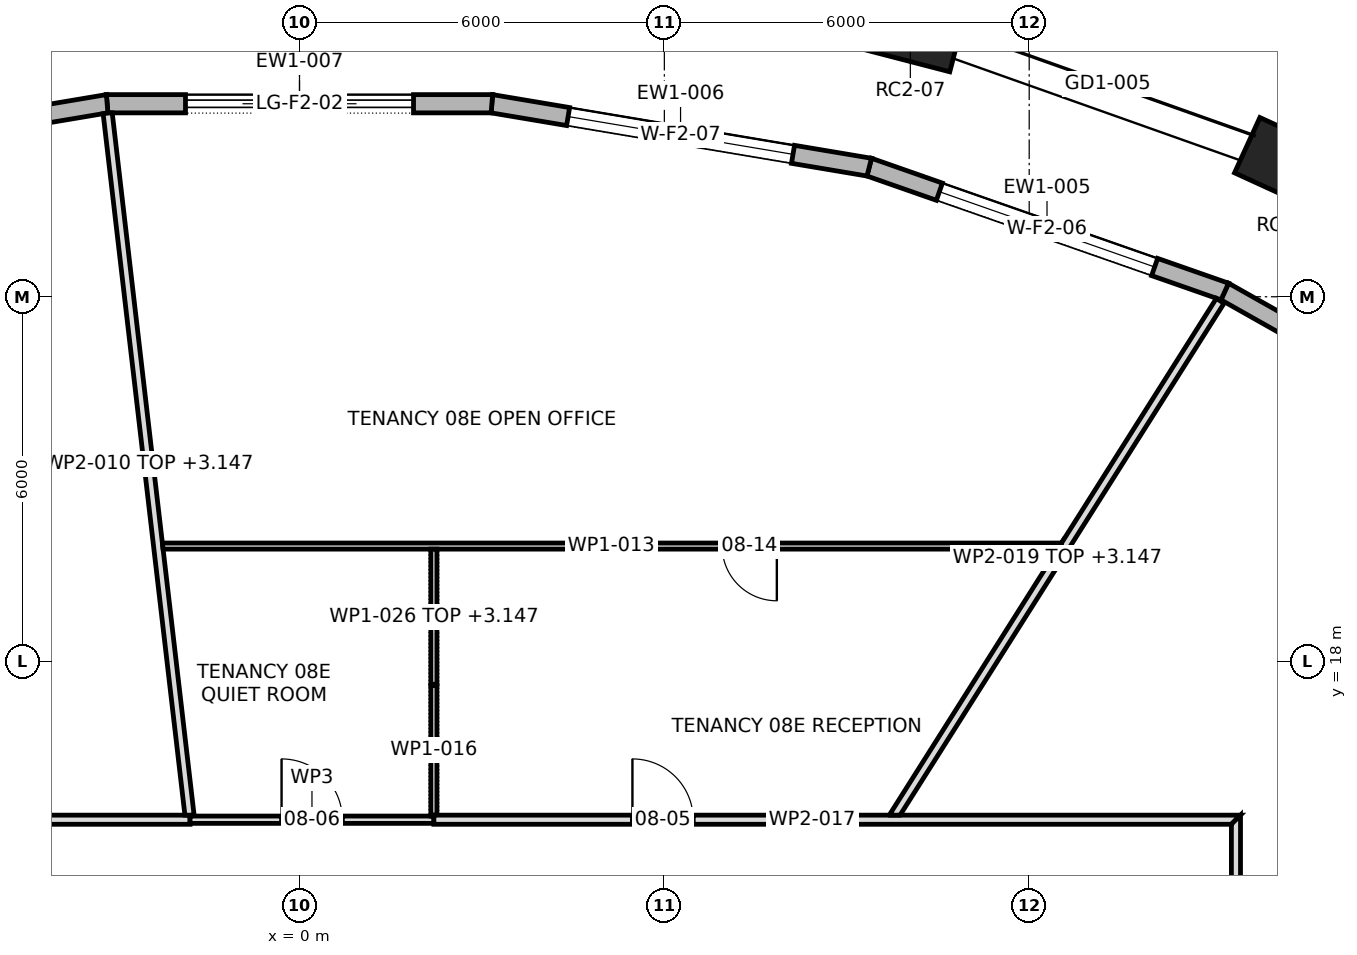
"""IFC4 building model, lengths in metres.
Left out: names, types, materials, properties, quantities, classifications, styles, units other than length and angle.
Written with IfcOpenShell. Run it as: python <this file> out.ifc"""

import sys

from ifc_helpers import new_model, si_unit, direction, frame, frame_2d, origin, origin_2d, place, context, subcontext, project, spatial, polyline, rectangle, outline, extrude, element, fill, save


model = new_model("IFC4")
c1 = context("Model", 3, precision=1e-05, world=origin(), true_north=direction((0.0, 1.0)))
c2 = subcontext(c1, "Body", "Model", "MODEL_VIEW")
j1 = project(units=[si_unit("LENGTHUNIT", "METRE"), si_unit("PLANEANGLEUNIT", "RADIAN")], contexts=[c1])
p1 = place(None, origin())
s1 = spatial("IfcSite", under=j1, at=p1, CompositionType="ELEMENT")
p2 = place(p1, origin())
s2 = spatial("IfcBuilding", under=s1, at=p2, CompositionType="ELEMENT")
p3 = place(p2, frame((0.0, 0.0, 125.5)))
s3 = spatial("IfcBuildingStorey", under=s2, at=p3, CompositionType="ELEMENT", Elevation=125.5)
for number, where, z_axis, x_axis in (
    (1, (16.313, 26.159, 0.0), (0.0, 0.0, 1.0), (-0.909, 0.417, 0.0)),
    (2, (10.045, 28.385, 0.0), (0.0, 0.0, 1.0), (-0.968, 0.252, 0.0)),
):
    element("IfcColumn", number, at=place(p3, frame(where, z_axis=z_axis, x_axis=x_axis)), inside=s3, PredefinedType="COLUMN", context=c2, shape_type="SweptSolid", body=[
        extrude(rectangle(XDim=1.6, YDim=1.0, at=origin_2d()), origin(), (0.0, 0.0, 1.0), 4.2),
    ])
p4 = place(p3, frame((20.48, 21.115, 0.0), z_axis=(0.0, 0.0, 1.0), x_axis=(-0.870858332497, 0.491534093142, 0.0)))
e3 = element("IfcWall", 3, at=p4, inside=s3, PredefinedType="STANDARD", context=c2, shape_type="SweptSolid", body=[
    extrude(outline(polyline([(-0.014, -0.15), (6.058, -0.15), (6.031, 0.15), (0.014, 0.15), (-0.014, -0.15)])), origin(), (0.0, 0.0, 1.0), 3.9),
])
p5 = place(p4, frame((1.147, 0.0, 0.6)))
e4 = element("IfcOpeningElement", 4, at=p5, cuts=e3, PredefinedType="OPENING", context=c2, shape_type="SweptSolid", body=[
    extrude(rectangle(XDim=3.75, YDim=2.85, at=frame_2d((1.875, 1.425))), frame((0.0, 0.162, 0.0), z_axis=(0.0, -1.0, 0.0), x_axis=(1.0, 0.0, 0.0)), (0.0, 0.0, 1.0), 0.324),
])
p6 = place(p3, frame((15.216, 24.086, 0.0), z_axis=(0.0, 0.0, 1.0), x_axis=(-0.94389706045, 0.330239820849, 0.0)))
e5 = element("IfcWall", 5, at=p6, inside=s3, PredefinedType="STANDARD", context=c2, shape_type="SweptSolid", body=[
    extrude(outline(polyline([(-0.013, -0.15), (6.207, -0.15), (6.182, 0.15), (0.013, 0.15), (-0.013, -0.15)])), origin(), (0.0, 0.0, 1.0), 3.9),
])
p7 = place(p6, frame((1.222, 0.0, 0.6)))
e6 = element("IfcOpeningElement", 6, at=p7, cuts=e5, PredefinedType="OPENING", context=c2, shape_type="SweptSolid", body=[
    extrude(rectangle(XDim=3.75, YDim=2.85, at=frame_2d((1.875, 1.425))), frame((0.0, 0.162, 0.0), z_axis=(0.0, -1.0, 0.0), x_axis=(1.0, 0.0, 0.0)), (0.0, 0.0, 1.0), 0.324),
])
p8 = place(p3, frame((9.369, 26.131, 0.0), z_axis=(0.0, 0.0, 1.0), x_axis=(-0.986176011722, 0.165701158427, 0.0)))
e7 = element("IfcWall", 7, at=p8, inside=s3, PredefinedType="STANDARD", context=c2, shape_type="SweptSolid", body=[
    extrude(outline(polyline([(-0.013, -0.15), (6.305, -0.15), (6.28, 0.15), (0.013, 0.15), (-0.013, -0.15)])), origin(), (0.0, 0.0, 1.0), 3.9),
])
p9 = place(p8, frame((1.271, 0.0, 0.6)))
e8 = element("IfcOpeningElement", 8, at=p9, cuts=e7, PredefinedType="OPENING", context=c2, shape_type="SweptSolid", body=[
    extrude(rectangle(XDim=3.75, YDim=2.85, at=frame_2d((1.875, 1.425))), frame((0.0, 0.162, 0.0), z_axis=(0.0, -1.0, 0.0), x_axis=(1.0, 0.0, 0.0)), (0.0, 0.0, 1.0), 0.324),
])
p10 = place(p3, frame((3.164, 27.174, 0.0), z_axis=(0.0, 0.0, 1.0), x_axis=(-1.0, 0.0, 0.0)))
e9 = element("IfcWall", 9, at=p10, inside=s3, PredefinedType="STANDARD", context=c2, shape_type="SweptSolid", body=[
    extrude(outline(polyline([(-0.012, -0.15), (6.34, -0.15), (6.315, 0.15), (0.012, 0.15), (-0.012, -0.15)])), origin(), (0.0, 0.0, 1.0), 3.9),
])
p11 = place(p10, frame((1.289, 0.0, 0.0)))
e10 = element("IfcOpeningElement", 10, at=p11, cuts=e9, PredefinedType="OPENING", context=c2, shape_type="SweptSolid", body=[
    extrude(rectangle(XDim=3.75, YDim=3.45, at=frame_2d((1.875, 1.725))), frame((0.0, 0.162, 0.0), z_axis=(0.0, -1.0, 0.0), x_axis=(1.0, 0.0, 0.0)), (0.0, 0.0, 1.0), 0.324),
])
p12 = place(p3, frame((-3.164, 27.174, 0.0), z_axis=(0.0, 0.0, 1.0), x_axis=(-0.986176011722, -0.165701158427, 0.0)))
e11 = element("IfcWall", 11, at=p12, inside=s3, PredefinedType="STANDARD", context=c2, shape_type="SweptSolid", body=[
    extrude(outline(polyline([(-0.012, -0.15), (6.305, -0.15), (6.28, 0.15), (0.012, 0.15), (-0.012, -0.15)])), origin(), (0.0, 0.0, 1.0), 3.9),
])
p13 = place(p12, frame((1.271, 0.0, 0.6)))
e12 = element("IfcOpeningElement", 12, at=p13, cuts=e11, PredefinedType="OPENING", context=c2, shape_type="SweptSolid", body=[
    extrude(rectangle(XDim=3.75, YDim=2.85, at=frame_2d((1.875, 1.425))), frame((0.0, 0.162, 0.0), z_axis=(0.0, -1.0, 0.0), x_axis=(1.0, 0.0, 0.0)), (0.0, 0.0, 1.0), 0.324),
])
p14 = place(p3, frame((-15.475, 15.4, 0.0), z_axis=(0.0, 0.0, 1.0), x_axis=(1.0, 0.0, 0.0)))
e13 = element("IfcWall", 13, at=p14, inside=s3, PredefinedType="PARTITIONING", context=c2, shape_type="SweptSolid", body=[
    extrude(outline(polyline([(13.675, 0.075), (11.721, 0.075), (9.768, 0.075), (7.814, 0.075), (5.861, 0.075), (3.907, 0.075), (1.954, 0.075), (0.0, 0.075), (0.15, -0.075), (2.082, -0.075), (4.014, -0.075), (5.947, -0.075), (7.879, -0.075), (9.811, -0.075), (11.743, -0.075), (13.675, -0.075), (13.675, 0.075)])), origin(), (0.0, 0.0, 1.0), 3.9),
])
p15 = place(p14, frame((5.975, 0.0, 0.0)))
e14 = element("IfcOpeningElement", 14, at=p15, cuts=e13, PredefinedType="OPENING", context=c2, shape_type="SweptSolid", body=[
    extrude(rectangle(XDim=1.8, YDim=2.1, at=frame_2d((0.9, 1.05))), frame((0.0, 0.087, 0.0), z_axis=(0.0, -1.0, 0.0), x_axis=(1.0, 0.0, 0.0)), (0.0, 0.0, 1.0), 0.174),
])
p16 = place(p3, frame((-3.155, 27.019, 0.0), z_axis=(0.0, 0.0, 1.0), x_axis=(0.11582313458, -0.993269853311, 0.0)))
e15 = element("IfcWall", 15, at=p16, inside=s3, PredefinedType="PARTITIONING", context=c2, shape_type="SweptSolid", body=[
    extrude(outline(polyline([(0.0, -0.075), (1.936, -0.075), (3.871, -0.075), (5.807, -0.075), (7.742, -0.075), (9.678, -0.075), (11.614, -0.075), (11.624, 0.009), (11.638, 0.007), (11.646, 0.072), (11.646, 0.075), (9.706, 0.075), (7.765, 0.075), (5.825, 0.075), (3.885, 0.075), (1.944, 0.075), (0.004, 0.075), (0.0, 0.042), (0.0, -0.075)])), origin(), (0.0, 0.0, 1.0), 3.147),
])
p17 = place(p3, frame((-2.255, 19.9, 0.0), z_axis=(0.0, 0.0, 1.0), x_axis=(1.0, 0.0, 0.0)))
e16 = element("IfcWall", 16, at=p17, inside=s3, PredefinedType="PARTITIONING", context=c2, shape_type="SweptSolid", body=[
    extrude(outline(polyline([(0.011, -0.05), (1.479, -0.05), (2.947, -0.05), (4.415, -0.05), (4.415, -0.05), (4.515, -0.05), (4.515, -0.05), (6.216, -0.05), (7.917, -0.05), (9.619, -0.05), (11.32, -0.05), (13.021, -0.05), (14.723, -0.05), (14.775, 0.032), (14.775, 0.032), (14.786, 0.05), (14.786, 0.05), (12.938, 0.05), (11.089, 0.05), (9.241, 0.05), (7.393, 0.05), (5.545, 0.05), (3.697, 0.05), (1.848, 0.05), (0.0, 0.05), (0.0, 0.048), (0.011, -0.05)])), origin(), (0.0, 0.0, 1.0), 3.9),
])
p18 = place(p17, frame((9.205, 0.0, 0.0)))
e17 = element("IfcOpeningElement", 17, at=p18, cuts=e16, PredefinedType="OPENING", context=c2, shape_type="SweptSolid", body=[
    extrude(rectangle(XDim=0.9, YDim=2.1, at=frame_2d((0.45, 1.05))), frame((0.0, 0.062, 0.0), z_axis=(0.0, -1.0, 0.0), x_axis=(1.0, 0.0, 0.0)), (0.0, 0.0, 1.0), 0.124),
])
p19 = place(p3, frame((-1.8, 15.4, 0.0), z_axis=(0.0, 0.0, 1.0), x_axis=(1.0, 0.0, 0.0)))
e18 = element("IfcWall", 18, at=p19, inside=s3, PredefinedType="PARTITIONING", context=c2, shape_type="SweptSolid", body=[
    extrude(rectangle(XDim=4.01, YDim=0.12, at=frame_2d((2.005, 0.0))), origin(), (0.0, 0.0, 1.0), 3.9),
])
p20 = place(p19, frame((1.505, 0.0, 0.0)))
e19 = element("IfcOpeningElement", 19, at=p20, cuts=e18, PredefinedType="OPENING", context=c2, shape_type="SweptSolid", body=[
    extrude(rectangle(XDim=1.0, YDim=2.1, at=frame_2d((0.5, 1.05))), frame((0.0, 0.072, 0.0), z_axis=(0.0, -1.0, 0.0), x_axis=(1.0, 0.0, 0.0)), (0.0, 0.0, 1.0), 0.144),
])
p21 = place(p3, frame((2.21, 15.46, 0.0), z_axis=(0.0, 0.0, 1.0), x_axis=(0.0, 1.0, 0.0)))
e20 = element("IfcWall", 20, at=p21, inside=s3, PredefinedType="PARTITIONING", context=c2, shape_type="SweptSolid", body=[
    extrude(outline(polyline([(0.0, 0.05), (0.0, 0.0), (0.015, 0.0), (0.015, -0.05), (2.157, -0.05), (2.157, 0.05), (0.0, 0.05)])), origin(), (0.0, 0.0, 1.0), 3.9),
])
p22 = place(p3, frame((2.21, 15.4, 0.0), z_axis=(0.0, 0.0, 1.0), x_axis=(1.0, 0.0, 0.0)))
e21 = element("IfcWall", 21, at=p22, inside=s3, PredefinedType="PARTITIONING", context=c2, shape_type="SweptSolid", body=[
    extrude(outline(polyline([(0.0, -0.075), (1.874, -0.075), (3.747, -0.075), (5.621, -0.075), (7.494, -0.075), (9.368, -0.075), (11.241, -0.075), (13.115, -0.075), (13.265, 0.075), (11.37, 0.075), (9.475, 0.075), (7.58, 0.075), (5.685, 0.075), (3.79, 0.075), (1.895, 0.075), (0.0, 0.075), (0.0, -0.075)])), origin(), (0.0, 0.0, 1.0), 3.9),
])
p23 = place(p22, frame((3.265, 0.0, 0.0)))
e22 = element("IfcOpeningElement", 22, at=p23, cuts=e21, PredefinedType="OPENING", context=c2, shape_type="SweptSolid", body=[
    extrude(rectangle(XDim=1.0, YDim=2.1, at=frame_2d((0.5, 1.05))), frame((0.0, 0.087, 0.0), z_axis=(0.0, -1.0, 0.0), x_axis=(1.0, 0.0, 0.0)), (0.0, 0.0, 1.0), 0.174),
])
p24 = place(p3, frame((9.762, 15.435, 0.0), z_axis=(0.0, 0.0, 1.0), x_axis=(0.534830284385, 0.844959506074, 0.0)))
e23 = element("IfcWall", 23, at=p24, inside=s3, PredefinedType="PARTITIONING", context=c2, shape_type="SweptSolid", body=[
    extrude(outline(polyline([(10.057, 0.075), (8.47, 0.075), (6.883, 0.075), (5.295, 0.075), (5.211, 0.022), (5.177, 0.075), (3.452, 0.075), (1.726, 0.075), (0.0, 0.075), (0.0, 0.075), (0.095, -0.075), (2.087, -0.075), (4.08, -0.075), (6.072, -0.075), (8.064, -0.075), (10.057, -0.075), (10.057, 0.075)])), origin(), (0.0, 0.0, 1.0), 3.147),
])
p25 = place(p3, frame((15.4, -15.475, 0.0), z_axis=(0.0, 0.0, 1.0), x_axis=(0.0, 1.0, 0.0)))
e24 = element("IfcWall", 24, at=p25, inside=s3, PredefinedType="PARTITIONING", context=c2, shape_type="SweptSolid", body=[
    extrude(outline(polyline([(0.0, -0.075), (1.935, -0.075), (3.869, -0.075), (5.803, -0.075), (7.738, -0.075), (9.672, -0.075), (11.606, -0.075), (13.541, -0.075), (15.475, -0.075), (17.409, -0.075), (19.344, -0.075), (21.278, -0.075), (23.212, -0.075), (25.147, -0.075), (27.081, -0.075), (29.016, -0.075), (30.95, -0.075), (30.8, 0.075), (28.885, 0.075), (26.969, 0.075), (25.053, 0.075), (23.138, 0.075), (21.222, 0.075), (19.306, 0.075), (17.391, 0.075), (15.475, 0.075), (13.56, 0.075), (11.644, 0.075), (9.728, 0.075), (7.812, 0.075), (5.897, 0.075), (3.981, 0.075), (2.066, 0.075), (0.15, 0.075), (0.0, -0.075)])), origin(), (0.0, 0.0, 1.0), 3.9),
])
p26 = place(p25, frame((8.595, 0.0, 0.0)))
e25 = element("IfcOpeningElement", 25, at=p26, cuts=e24, PredefinedType="OPENING", context=c2, shape_type="SweptSolid", body=[
    extrude(rectangle(XDim=1.8, YDim=2.1, at=frame_2d((0.9, 1.05))), frame((0.0, 0.087, 0.0), z_axis=(0.0, -1.0, 0.0), x_axis=(1.0, 0.0, 0.0)), (0.0, 0.0, 1.0), 0.174),
])
p27 = place(p25, frame((17.81, 0.0, 0.0)))
e26 = element("IfcOpeningElement", 26, at=p27, cuts=e24, PredefinedType="OPENING", context=c2, shape_type="SweptSolid", body=[
    extrude(rectangle(XDim=1.0, YDim=2.1, at=frame_2d((0.5, 1.05))), frame((0.0, 0.087, 0.0), z_axis=(0.0, -1.0, 0.0), x_axis=(1.0, 0.0, 0.0)), (0.0, 0.0, 1.0), 0.174),
])
p28 = place(p25, frame((25.75, 0.0, 0.0)))
e27 = element("IfcOpeningElement", 27, at=p28, cuts=e24, PredefinedType="OPENING", context=c2, shape_type="SweptSolid", body=[
    extrude(rectangle(XDim=1.8, YDim=2.1, at=frame_2d((0.9, 1.05))), frame((0.0, 0.087, 0.0), z_axis=(0.0, -1.0, 0.0), x_axis=(1.0, 0.0, 0.0)), (0.0, 0.0, 1.0), 0.174),
])
p29 = place(p3, frame((2.21, 17.617, 0.0), z_axis=(0.0, 0.0, 1.0), x_axis=(0.0, 1.0, 0.0)))
e28 = element("IfcWall", 28, at=p29, inside=s3, PredefinedType="PARTITIONING", context=c2, shape_type="SweptSolid", body=[
    extrude(outline(polyline([(0.0, -0.05), (2.233, -0.05), (2.233, 0.05), (0.0, 0.05), (0.0, -0.05)])), origin(), (0.0, 0.0, 1.0), 3.147),
])
p30 = place(p7, origin())
e29 = element("IfcWindow", 29, at=p30, inside=s3, PartitioningType="TRIPLE_PANEL_VERTICAL", PredefinedType="WINDOW", context=c2, shape_type="SweptSolid", body=[
    extrude(rectangle(XDim=3.75, YDim=2.85, at=frame_2d((1.875, 1.425))), frame((0.0, 0.03, 0.0), z_axis=(0.0, -1.0, 0.0), x_axis=(1.0, 0.0, 0.0)), (0.0, 0.0, 1.0), 0.06),
])
fill(e6, e29)
p31 = place(p9, origin())
e30 = element("IfcWindow", 30, at=p31, inside=s3, PartitioningType="TRIPLE_PANEL_VERTICAL", PredefinedType="WINDOW", context=c2, shape_type="SweptSolid", body=[
    extrude(rectangle(XDim=3.75, YDim=2.85, at=frame_2d((1.875, 1.425))), frame((0.0, 0.03, 0.0), z_axis=(0.0, -1.0, 0.0), x_axis=(1.0, 0.0, 0.0)), (0.0, 0.0, 1.0), 0.06),
])
fill(e8, e30)
p32 = place(p11, origin())
e31 = element("IfcDoor", 31, at=p32, inside=s3, OperationType="DOUBLE_DOOR_SLIDING", PredefinedType="DOOR", context=c2, shape_type="SweptSolid", body=[
    extrude(rectangle(XDim=3.75, YDim=3.45, at=frame_2d((1.875, 1.725))), frame((0.0, 0.025, 0.0), z_axis=(0.0, -1.0, 0.0), x_axis=(1.0, 0.0, 0.0)), (0.0, 0.0, 1.0), 0.05),
])
fill(e10, e31)
p33 = place(p23, origin())
e32 = element("IfcDoor", 32, at=p33, inside=s3, OperationType="SINGLE_SWING_RIGHT", PredefinedType="DOOR", context=c2, shape_type="SweptSolid", body=[
    extrude(rectangle(XDim=1.0, YDim=2.1, at=frame_2d((0.5, 1.05))), frame((0.0, 0.025, 0.0), z_axis=(0.0, -1.0, 0.0), x_axis=(1.0, 0.0, 0.0)), (0.0, 0.0, 1.0), 0.05),
])
fill(e22, e32)
p34 = place(p20, origin())
e33 = element("IfcDoor", 33, at=p34, inside=s3, OperationType="SINGLE_SWING_RIGHT", PredefinedType="DOOR", context=c2, shape_type="SweptSolid", body=[
    extrude(rectangle(XDim=1.0, YDim=2.1, at=frame_2d((0.5, 1.05))), frame((0.0, 0.025, 0.0), z_axis=(0.0, -1.0, 0.0), x_axis=(1.0, 0.0, 0.0)), (0.0, 0.0, 1.0), 0.05),
])
fill(e19, e33)
p35 = place(p18, frame((0.9, 0.0, 0.0), z_axis=(0.0, 0.0, 1.0), x_axis=(-1.0, 0.0, 0.0)))
e34 = element("IfcDoor", 34, at=p35, inside=s3, OperationType="SINGLE_SWING_RIGHT", PredefinedType="DOOR", context=c2, shape_type="SweptSolid", body=[
    extrude(rectangle(XDim=0.9, YDim=2.1, at=frame_2d((0.45, 1.05))), frame((0.0, 0.025, 0.0), z_axis=(0.0, -1.0, 0.0), x_axis=(1.0, 0.0, 0.0)), (0.0, 0.0, 1.0), 0.05),
])
fill(e17, e34)
save(model, sys.argv[1])
